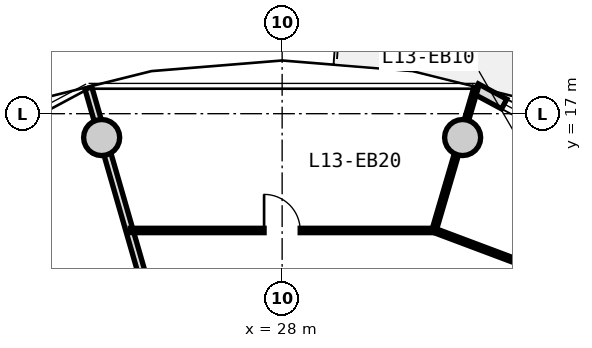
"""IFC4 building model, lengths in metres.
Left out: names, types, materials, properties, quantities, classifications, styles, units other than length and angle.
Written with IfcOpenShell. Run it as: python <this file> out.ifc"""

import sys

from ifc_helpers import new_model, si_unit, direction, frame, frame_2d, origin, origin_2d, place, context, subcontext, project, spatial, rectangle, circle, extrude, source, transform, mapped, element, fill, save


model = new_model("IFC4")
c1 = context("Model", 3, precision=1e-05, world=origin(), true_north=direction((0.0, 1.0)))
c2 = subcontext(c1, "Body", "Model", "MODEL_VIEW")
j1 = project(units=[si_unit("LENGTHUNIT", "METRE"), si_unit("PLANEANGLEUNIT", "RADIAN")], contexts=[c1])
p1 = place(None, origin())
s1 = spatial("IfcSite", under=j1, at=p1, CompositionType="ELEMENT")
p2 = place(p1, origin())
s2 = spatial("IfcBuilding", under=s1, at=p2, CompositionType="ELEMENT")
p3 = place(p2, frame((0.0, 0.0, 46.0)))
s3 = spatial("IfcBuildingStorey", under=s2, at=p3, CompositionType="ELEMENT", Elevation=46.0)
m1 = source(origin(), c2, "Body", "SweptSolid", [
    extrude(circle(Radius=0.475, at=origin_2d()), origin(), (0.0, 0.0, 1.0), 3.05),
])
for number, where, z_axis, x_axis in (
    (1, (32.749, 16.373, 0.0), (0.0, 0.0, 1.0), (1.0, 0.0, 0.0)),
    (2, (23.251, 16.373, 0.0), (0.0, 0.0, 1.0), (1.0, 0.0, 0.0)),
):
    element("IfcColumn", number, at=place(p3, frame(where, z_axis=z_axis, x_axis=x_axis)), inside=s3, PredefinedType="COLUMN", context=c2, shape_type="MappedRepresentation", body=[
        mapped(m1, transform((0.0, 0.0, 0.0), x_axis=(1.0, 0.0, 0.0), y_axis=(0.0, 1.0, 0.0), z_axis=(0.0, 0.0, 1.0), scale=1.0)),
    ])
m2 = source(origin(), c2, "Body", "SweptSolid", [
    extrude(rectangle(XDim=10.011, YDim=0.29, at=frame_2d((5.005, 0.0))), origin(), (0.0, 0.0, 1.0), 2.79),
])
p4 = place(p3, frame((33.094, 17.657, 0.0), z_axis=(0.0, 0.0, 1.0), x_axis=(0.881272505317, -0.472608475773, 0.0)))
e3 = element("IfcWall", 3, at=p4, inside=s3, PredefinedType="SOLIDWALL", context=c2, shape_type="MappedRepresentation", body=[
    mapped(m2, transform((0.0, 0.0, 0.0), x_axis=(1.0, 0.0, 0.0), y_axis=(0.0, 1.0, 0.0), z_axis=(0.0, 0.0, 1.0), scale=1.0)),
])
p5 = place(p4, frame((7.78, 0.0, 0.0)))
e4 = element("IfcOpeningElement", 4, at=p5, cuts=e3, PredefinedType="OPENING", context=c2, shape_type="SweptSolid", body=[
    extrude(rectangle(XDim=1.15, YDim=2.25, at=frame_2d((0.575, 1.125))), frame((0.0, 0.155, 0.0), z_axis=(0.0, -1.0, 0.0), x_axis=(1.0, 0.0, 0.0)), (0.0, 0.0, 1.0), 0.31),
])
p6 = place(p4, frame((0.85, 0.0, 0.85)))
e5 = element("IfcOpeningElement", 5, at=p6, cuts=e3, PredefinedType="OPENING", context=c2, shape_type="SweptSolid", body=[
    extrude(rectangle(XDim=1.2, YDim=1.5, at=frame_2d((0.6, 0.75))), frame((0.0, 0.155, 0.0), z_axis=(0.0, -1.0, 0.0), x_axis=(1.0, 0.0, 0.0)), (0.0, 0.0, 1.0), 0.31),
])
m3 = source(origin(), c2, "Body", "SweptSolid", [
    extrude(rectangle(XDim=10.196, YDim=0.19, at=frame_2d((5.098, 0.0))), origin(), (0.0, 0.0, 1.0), 2.225),
])
p7 = place(p3, frame((25.727, 7.88, 0.0), z_axis=(0.0, 0.0, 1.0), x_axis=(-0.277136420347, 0.960830580549, 0.0)))
e6 = element("IfcWall", 6, at=p7, inside=s3, PredefinedType="PARTITIONING", context=c2, shape_type="MappedRepresentation", body=[
    mapped(m3, transform((0.0, 0.0, 0.0), x_axis=(1.0, 0.0, 0.0), y_axis=(0.0, 1.0, 0.0), z_axis=(0.0, 0.0, 1.0), scale=1.0)),
])
m4 = source(origin(), c2, "Body", "SweptSolid", [
    extrude(rectangle(XDim=8.32, YDim=0.115, at=frame_2d((4.16, 0.0))), origin(), (0.0, 0.0, 1.0), 2.775),
])
p8 = place(p3, frame((39.786, 11.006, 0.0), z_axis=(0.0, 0.0, 1.0), x_axis=(-0.936180763098, 0.351518959382, 0.0)))
e7 = element("IfcWall", 7, at=p8, inside=s3, PredefinedType="PARTITIONING", context=c2, shape_type="MappedRepresentation", body=[
    mapped(m4, transform((0.0, 0.0, 0.0), x_axis=(1.0, 0.0, 0.0), y_axis=(0.0, 1.0, 0.0), z_axis=(0.0, 0.0, 1.0), scale=1.0)),
])
p9 = place(p8, frame((3.685, 0.0, 0.0)))
e8 = element("IfcOpeningElement", 8, at=p9, cuts=e7, PredefinedType="OPENING", context=c2, shape_type="SweptSolid", body=[
    extrude(rectangle(XDim=0.95, YDim=2.1, at=frame_2d((0.475, 1.05))), frame((0.0, 0.067, 0.0), z_axis=(0.0, -1.0, 0.0), x_axis=(1.0, 0.0, 0.0)), (0.0, 0.0, 1.0), 0.135),
])
m5 = source(origin(), c2, "Body", "SweptSolid", [
    extrude(rectangle(XDim=7.993, YDim=0.115, at=frame_2d((3.996, 0.0))), origin(), (0.0, 0.0, 1.0), 2.775),
])
p10 = place(p3, frame((31.996, 13.927, 0.0), z_axis=(0.0, 0.0, 1.0), x_axis=(-1.0, 0.0, 0.0)))
e9 = element("IfcWall", 9, at=p10, inside=s3, PredefinedType="PARTITIONING", context=c2, shape_type="MappedRepresentation", body=[
    mapped(m5, transform((0.0, 0.0, 0.0), x_axis=(1.0, 0.0, 0.0), y_axis=(0.0, 1.0, 0.0), z_axis=(0.0, 0.0, 1.0), scale=1.0)),
])
p11 = place(p10, frame((3.521, 0.0, 0.0)))
e10 = element("IfcOpeningElement", 10, at=p11, cuts=e9, PredefinedType="OPENING", context=c2, shape_type="SweptSolid", body=[
    extrude(rectangle(XDim=0.95, YDim=2.1, at=frame_2d((0.475, 1.05))), frame((0.0, 0.067, 0.0), z_axis=(0.0, -1.0, 0.0), x_axis=(1.0, 0.0, 0.0)), (0.0, 0.0, 1.0), 0.135),
])
m6 = source(origin(), c2, "Body", "SweptSolid", [
    extrude(rectangle(XDim=3.908, YDim=0.115, at=frame_2d((1.954, 0.0))), origin(), (0.0, 0.0, 1.0), 2.225),
])
p12 = place(p3, frame((31.996, 13.927, 0.0), z_axis=(0.0, 0.0, 1.0), x_axis=(0.282047948883, 0.959400309845, 0.0)))
e11 = element("IfcWall", 11, at=p12, inside=s3, PredefinedType="PARTITIONING", context=c2, shape_type="MappedRepresentation", body=[
    mapped(m6, transform((0.0, 0.0, 0.0), x_axis=(1.0, 0.0, 0.0), y_axis=(0.0, 1.0, 0.0), z_axis=(0.0, 0.0, 1.0), scale=1.0)),
])
m7 = source(origin(), c2, "Body", "SweptSolid", [
    extrude(rectangle(XDim=1.2, YDim=1.5, at=frame_2d((0.6, 0.75))), frame((0.0, 0.03, 0.0), z_axis=(0.0, -1.0, 0.0), x_axis=(1.0, 0.0, 0.0)), (0.0, 0.0, 1.0), 0.06),
])
p13 = place(p6, origin())
e12 = element("IfcWindow", 12, at=p13, inside=s3, PartitioningType="SINGLE_PANEL", PredefinedType="WINDOW", context=c2, shape_type="MappedRepresentation", body=[
    mapped(m7, transform((0.0, 0.0, 0.0), x_axis=(1.0, 0.0, 0.0), y_axis=(0.0, 1.0, 0.0), z_axis=(0.0, 0.0, 1.0), scale=1.0)),
])
fill(e5, e12)
m8 = source(origin(), c2, "Body", "SweptSolid", [
    extrude(rectangle(XDim=0.95, YDim=2.1, at=frame_2d((0.475, 1.05))), frame((0.0, 0.025, 0.0), z_axis=(0.0, -1.0, 0.0), x_axis=(1.0, 0.0, 0.0)), (0.0, 0.0, 1.0), 0.05),
])
p14 = place(p11, frame((0.95, 0.0, 0.0), z_axis=(0.0, 0.0, 1.0), x_axis=(-1.0, 0.0, 0.0)))
e13 = element("IfcDoor", 13, at=p14, inside=s3, OperationType="SINGLE_SWING_LEFT", PredefinedType="DOOR", context=c2, shape_type="MappedRepresentation", body=[
    mapped(m8, transform((0.0, 0.0, 0.0), x_axis=(1.0, 0.0, 0.0), y_axis=(0.0, 1.0, 0.0), z_axis=(0.0, 0.0, 1.0), scale=1.0)),
])
fill(e10, e13)
save(model, sys.argv[1])
